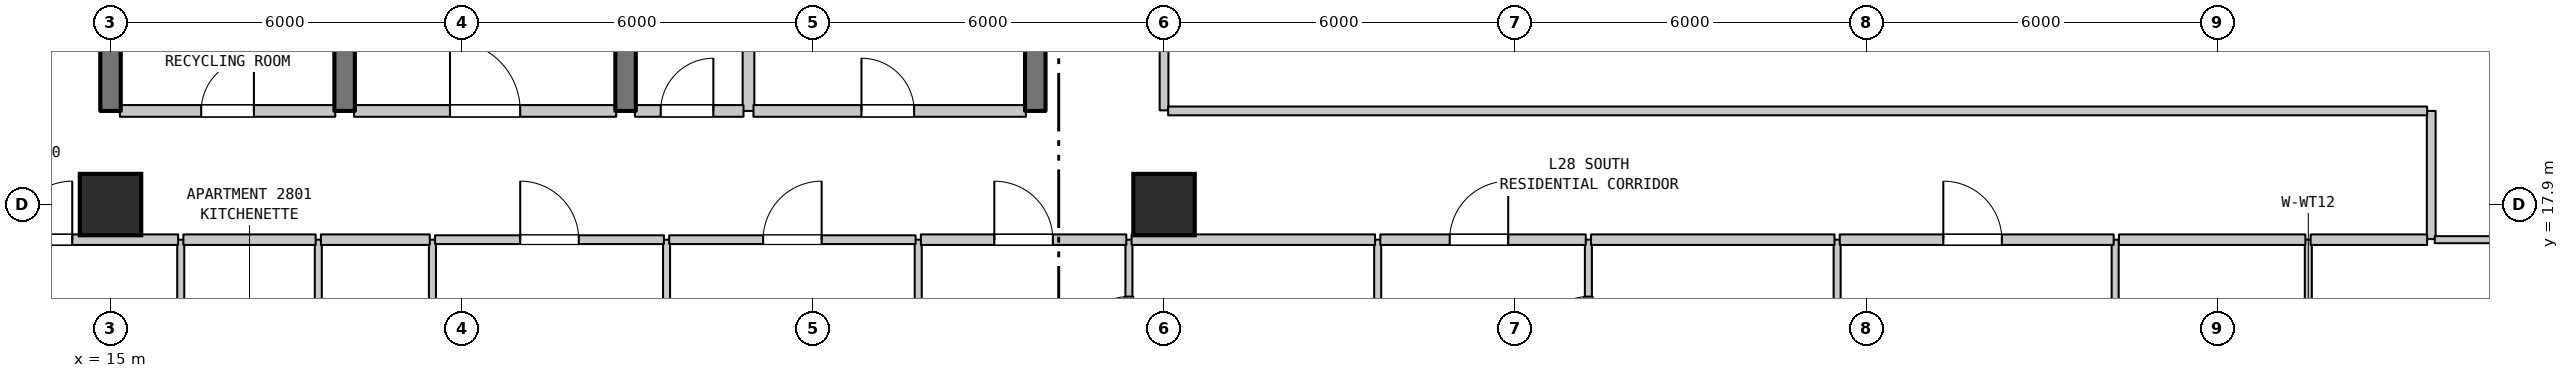
"""IFC4 building model, lengths in metres.
Left out: names, types, materials, properties, quantities, classifications, styles, units other than length and angle.
Written with IfcOpenShell. Run it as: python <this file> out.ifc"""

import sys

from ifc_helpers import new_model, si_unit, direction, frame, frame_2d, origin, origin_2d, place, context, subcontext, project, spatial, rectangle, extrude, element, fill, save


model = new_model("IFC4")
c1 = context("Model", 3, precision=1e-05, world=origin(), true_north=direction((0.0, 1.0)))
c2 = subcontext(c1, "Body", "Model", "MODEL_VIEW")
j1 = project(units=[si_unit("LENGTHUNIT", "METRE"), si_unit("PLANEANGLEUNIT", "RADIAN")], contexts=[c1])
p1 = place(None, origin())
s1 = spatial("IfcSite", under=j1, at=p1, CompositionType="ELEMENT")
p2 = place(p1, origin())
s2 = spatial("IfcBuilding", under=s1, at=p2, CompositionType="ELEMENT")
p3 = place(p2, frame((0.0, 0.0, 116.8)))
s3 = spatial("IfcBuildingStorey", under=s2, at=p3, CompositionType="ELEMENT", Elevation=116.8)
for number, where, z_axis, x_axis in (
    (1, (15.0, 17.9, 0.0), (0.0, 0.0, 1.0), (1.0, 0.0, 0.0)),
    (2, (33.0, 17.9, 0.0), (0.0, 0.0, 1.0), (1.0, 0.0, 0.0)),
):
    element("IfcColumn", number, at=place(p3, frame(where, z_axis=z_axis, x_axis=x_axis)), inside=s3, PredefinedType="COLUMN", context=c2, shape_type="SweptSolid", body=[
        extrude(rectangle(XDim=1.05, YDim=1.05, at=origin_2d()), origin(), (0.0, 0.0, 1.0), 3.7),
    ])
p4 = place(p3, frame((15.0, 19.5, 0.0), z_axis=(0.0, 0.0, 1.0), x_axis=(0.0, 1.0, 0.0)))
e3 = element("IfcWall", 3, at=p4, inside=s3, PredefinedType="SHEAR", context=c2, shape_type="SweptSolid", body=[
    extrude(rectangle(XDim=3.2, YDim=0.35, at=frame_2d((1.6, 0.0))), origin(), (0.0, 0.0, 1.0), 3.38),
])
p5 = place(p3, frame((16.2, 14.1, 0.0), z_axis=(0.0, 0.0, 1.0), x_axis=(0.0, 1.0, 0.0)))
e4 = element("IfcWall", 4, at=p5, inside=s3, PredefinedType="PARTITIONING", context=c2, shape_type="SweptSolid", body=[
    extrude(rectangle(XDim=3.2, YDim=0.12, at=frame_2d((1.6, 0.0))), origin(), (0.0, 0.0, 1.0), 3.38),
])
p6 = place(p5, frame((1.15, 0.0, 0.0)))
e5 = element("IfcOpeningElement", 5, at=p6, cuts=e4, PredefinedType="OPENING", context=c2, shape_type="SweptSolid", body=[
    extrude(rectangle(XDim=0.9, YDim=2.15, at=frame_2d((0.45, 1.075))), frame((0.0, 0.07, 0.0), z_axis=(0.0, -1.0, 0.0), x_axis=(1.0, 0.0, 0.0)), (0.0, 0.0, 1.0), 0.14),
])
p7 = place(p3, frame((18.55, 14.1, 0.0), z_axis=(0.0, 0.0, 1.0), x_axis=(0.0, 1.0, 0.0)))
e6 = element("IfcWall", 6, at=p7, inside=s3, PredefinedType="PARTITIONING", context=c2, shape_type="SweptSolid", body=[
    extrude(rectangle(XDim=3.2, YDim=0.12, at=frame_2d((1.6, 0.0))), origin(), (0.0, 0.0, 1.0), 3.38),
])
p8 = place(p3, frame((19.0, 19.5, 0.0), z_axis=(0.0, 0.0, 1.0), x_axis=(0.0, 1.0, 0.0)))
e7 = element("IfcWall", 7, at=p8, inside=s3, PredefinedType="SHEAR", context=c2, shape_type="SweptSolid", body=[
    extrude(rectangle(XDim=3.2, YDim=0.35, at=frame_2d((1.6, 0.0))), origin(), (0.0, 0.0, 1.0), 3.38),
])
p9 = place(p3, frame((20.5, 7.154, 0.0), z_axis=(0.0, 0.0, 1.0), x_axis=(0.0, 1.0, 0.0)))
e8 = element("IfcWall", 8, at=p9, inside=s3, PredefinedType="PARTITIONING", context=c2, shape_type="SweptSolid", body=[
    extrude(rectangle(XDim=10.146, YDim=0.12, at=frame_2d((5.073, 0.0))), origin(), (0.0, 0.0, 1.0), 3.38),
])
p10 = place(p3, frame((23.8, 19.5, 0.0), z_axis=(0.0, 0.0, 1.0), x_axis=(0.0, 1.0, 0.0)))
e9 = element("IfcWall", 9, at=p10, inside=s3, PredefinedType="SHEAR", context=c2, shape_type="SweptSolid", body=[
    extrude(rectangle(XDim=3.2, YDim=0.35, at=frame_2d((1.6, 0.0))), origin(), (0.0, 0.0, 1.0), 3.38),
])
p11 = place(p3, frame((24.5, 0.71, 0.0), z_axis=(0.0, 0.0, 1.0), x_axis=(0.0, 1.0, 0.0)))
e10 = element("IfcWall", 10, at=p11, inside=s3, PredefinedType="PARTITIONING", context=c2, shape_type="SweptSolid", body=[
    extrude(rectangle(XDim=16.59, YDim=0.12, at=frame_2d((8.295, 0.0))), origin(), (0.0, 0.0, 1.0), 3.38),
])
p12 = place(p3, frame((25.9, 19.5, 0.0), z_axis=(0.0, 0.0, 1.0), x_axis=(0.0, 1.0, 0.0)))
e11 = element("IfcWall", 11, at=p12, inside=s3, PredefinedType="STANDARD", context=c2, shape_type="SweptSolid", body=[
    extrude(rectangle(XDim=3.2, YDim=0.2, at=frame_2d((1.6, 0.0))), origin(), (0.0, 0.0, 1.0), 3.38),
])
p13 = place(p3, frame((28.8, 0.71, 0.0), z_axis=(0.0, 0.0, 1.0), x_axis=(0.0, 1.0, 0.0)))
e12 = element("IfcWall", 12, at=p13, inside=s3, PredefinedType="PARTITIONING", context=c2, shape_type="SweptSolid", body=[
    extrude(rectangle(XDim=16.59, YDim=0.12, at=frame_2d((8.295, 0.0))), origin(), (0.0, 0.0, 1.0), 3.38),
])
p14 = place(p3, frame((30.8, 19.5, 0.0), z_axis=(0.0, 0.0, 1.0), x_axis=(0.0, 1.0, 0.0)))
e13 = element("IfcWall", 13, at=p14, inside=s3, PredefinedType="SHEAR", context=c2, shape_type="SweptSolid", body=[
    extrude(rectangle(XDim=3.2, YDim=0.35, at=frame_2d((1.6, 0.0))), origin(), (0.0, 0.0, 1.0), 3.38),
])
p15 = place(p3, frame((32.4, 14.6, 0.0), z_axis=(0.0, 0.0, 1.0), x_axis=(0.0, 1.0, 0.0)))
e14 = element("IfcWall", 14, at=p15, inside=s3, PredefinedType="PARTITIONING", context=c2, shape_type="SweptSolid", body=[
    extrude(rectangle(XDim=2.7, YDim=0.12, at=frame_2d((1.35, 0.0))), origin(), (0.0, 0.0, 1.0), 3.38),
])
p16 = place(p15, frame((0.828, 0.0, 0.0)))
e15 = element("IfcOpeningElement", 15, at=p16, cuts=e14, PredefinedType="OPENING", context=c2, shape_type="SweptSolid", body=[
    extrude(rectangle(XDim=0.9, YDim=2.1, at=frame_2d((0.45, 1.05))), frame((0.0, 0.07, 0.0), z_axis=(0.0, -1.0, 0.0), x_axis=(1.0, 0.0, 0.0)), (0.0, 0.0, 1.0), 0.14),
])
p17 = place(p3, frame((33.0, 19.51, 0.0), z_axis=(0.0, 0.0, 1.0), x_axis=(0.0, 1.0, 0.0)))
e16 = element("IfcWall", 16, at=p17, inside=s3, PredefinedType="STANDARD", context=c2, shape_type="SweptSolid", body=[
    extrude(rectangle(XDim=6.18, YDim=0.15, at=frame_2d((3.09, 0.0))), origin(), (0.0, 0.0, 1.0), 2.93),
])
p18 = place(p3, frame((36.65, 14.6, 0.0), z_axis=(0.0, 0.0, 1.0), x_axis=(0.0, 1.0, 0.0)))
e17 = element("IfcWall", 17, at=p18, inside=s3, PredefinedType="PARTITIONING", context=c2, shape_type="SweptSolid", body=[
    extrude(rectangle(XDim=2.7, YDim=0.12, at=frame_2d((1.35, 0.0))), origin(), (0.0, 0.0, 1.0), 3.38),
])
p19 = place(p3, frame((40.25, 14.6, 0.0), z_axis=(0.0, 0.0, 1.0), x_axis=(0.0, 1.0, 0.0)))
e18 = element("IfcWall", 18, at=p19, inside=s3, PredefinedType="PARTITIONING", context=c2, shape_type="SweptSolid", body=[
    extrude(rectangle(XDim=2.7, YDim=0.12, at=frame_2d((1.35, 0.0))), origin(), (0.0, 0.0, 1.0), 3.38),
])
p20 = place(p19, frame((0.828, 0.0, 0.0)))
e19 = element("IfcOpeningElement", 19, at=p20, cuts=e18, PredefinedType="OPENING", context=c2, shape_type="SweptSolid", body=[
    extrude(rectangle(XDim=0.9, YDim=2.1, at=frame_2d((0.45, 1.05))), frame((0.0, 0.07, 0.0), z_axis=(0.0, -1.0, 0.0), x_axis=(1.0, 0.0, 0.0)), (0.0, 0.0, 1.0), 0.14),
])
p21 = place(p3, frame((44.5, 14.85, 0.0), z_axis=(0.0, 0.0, 1.0), x_axis=(0.0, 1.0, 0.0)))
e20 = element("IfcWall", 20, at=p21, inside=s3, PredefinedType="PARTITIONING", context=c2, shape_type="SweptSolid", body=[
    extrude(rectangle(XDim=2.45, YDim=0.12, at=frame_2d((1.225, 0.0))), origin(), (0.0, 0.0, 1.0), 3.38),
])
for number, where, z_axis, x_axis in (
    (21, (49.25, 11.15, 0.0), (0.0, 0.0, 1.0), (0.0, 1.0, 0.0)),
    (22, (52.55, 11.15, 0.0), (0.0, 0.0, 1.0), (0.0, 1.0, 0.0)),
):
    element("IfcWall", number, at=place(p3, frame(where, z_axis=z_axis, x_axis=x_axis)), inside=s3, PredefinedType="PARTITIONING", context=c2, shape_type="SweptSolid", body=[
        extrude(rectangle(XDim=6.15, YDim=0.12, at=frame_2d((3.075, 0.0))), origin(), (0.0, 0.0, 1.0), 3.38),
    ])
p22 = place(p3, frame((54.65, 17.31, 0.0), z_axis=(0.0, 0.0, 1.0), x_axis=(0.0, 1.0, 0.0)))
e23 = element("IfcWall", 23, at=p22, inside=s3, PredefinedType="STANDARD", context=c2, shape_type="SweptSolid", body=[
    extrude(rectangle(XDim=2.19, YDim=0.15, at=frame_2d((1.095, 0.0))), origin(), (0.0, 0.0, 1.0), 3.38),
])
p23 = place(p3, frame((12.875, 17.3, 0.0), z_axis=(0.0, 0.0, 1.0), x_axis=(1.0, 0.0, 0.0)))
e24 = element("IfcWall", 24, at=p23, inside=s3, PredefinedType="STANDARD", context=c2, shape_type="SweptSolid", body=[
    extrude(rectangle(XDim=3.28, YDim=0.18, at=frame_2d((1.64, 0.0))), origin(), (0.0, 0.0, 1.0), 3.38),
])
p24 = place(p23, frame((0.471, 0.0, 0.0)))
e25 = element("IfcOpeningElement", 25, at=p24, cuts=e24, PredefinedType="OPENING", context=c2, shape_type="SweptSolid", body=[
    extrude(rectangle(XDim=1.0, YDim=2.15, at=frame_2d((0.5, 1.075))), frame((0.0, 0.1, 0.0), z_axis=(0.0, -1.0, 0.0), x_axis=(1.0, 0.0, 0.0)), (0.0, 0.0, 1.0), 0.2),
])
p25 = place(p3, frame((16.245, 17.3, 0.0), z_axis=(0.0, 0.0, 1.0), x_axis=(1.0, 0.0, 0.0)))
e26 = element("IfcWall", 26, at=p25, inside=s3, PredefinedType="STANDARD", context=c2, shape_type="SweptSolid", body=[
    extrude(rectangle(XDim=2.26, YDim=0.18, at=frame_2d((1.13, 0.0))), origin(), (0.0, 0.0, 1.0), 3.38),
])
p26 = place(p3, frame((18.595, 17.3, 0.0), z_axis=(0.0, 0.0, 1.0), x_axis=(1.0, 0.0, 0.0)))
e27 = element("IfcWall", 27, at=p26, inside=s3, PredefinedType="STANDARD", context=c2, shape_type="SweptSolid", body=[
    extrude(rectangle(XDim=1.86, YDim=0.18, at=frame_2d((0.93, 0.0))), origin(), (0.0, 0.0, 1.0), 3.38),
])
p27 = place(p3, frame((20.545, 17.3, 0.0), z_axis=(0.0, 0.0, 1.0), x_axis=(1.0, 0.0, 0.0)))
e28 = element("IfcWall", 28, at=p27, inside=s3, PredefinedType="STANDARD", context=c2, shape_type="SweptSolid", body=[
    extrude(rectangle(XDim=3.91, YDim=0.15, at=frame_2d((1.955, 0.0))), origin(), (0.0, 0.0, 1.0), 3.38),
])
p28 = place(p27, frame((1.455, 0.0, 0.0)))
e29 = element("IfcOpeningElement", 29, at=p28, cuts=e28, PredefinedType="OPENING", context=c2, shape_type="SweptSolid", body=[
    extrude(rectangle(XDim=1.0, YDim=2.15, at=frame_2d((0.5, 1.075))), frame((0.0, 0.085, 0.0), z_axis=(0.0, -1.0, 0.0), x_axis=(1.0, 0.0, 0.0)), (0.0, 0.0, 1.0), 0.17),
])
p29 = place(p3, frame((24.545, 17.3, 0.0), z_axis=(0.0, 0.0, 1.0), x_axis=(1.0, 0.0, 0.0)))
e30 = element("IfcWall", 30, at=p29, inside=s3, PredefinedType="STANDARD", context=c2, shape_type="SweptSolid", body=[
    extrude(rectangle(XDim=4.21, YDim=0.15, at=frame_2d((2.105, 0.0))), origin(), (0.0, 0.0, 1.0), 3.38),
])
p30 = place(p29, frame((1.605, 0.0, 0.0)))
e31 = element("IfcOpeningElement", 31, at=p30, cuts=e30, PredefinedType="OPENING", context=c2, shape_type="SweptSolid", body=[
    extrude(rectangle(XDim=1.0, YDim=2.15, at=frame_2d((0.5, 1.075))), frame((0.0, 0.085, 0.0), z_axis=(0.0, -1.0, 0.0), x_axis=(1.0, 0.0, 0.0)), (0.0, 0.0, 1.0), 0.17),
])
p31 = place(p3, frame((28.845, 17.3, 0.0), z_axis=(0.0, 0.0, 1.0), x_axis=(1.0, 0.0, 0.0)))
e32 = element("IfcWall", 32, at=p31, inside=s3, PredefinedType="STANDARD", context=c2, shape_type="SweptSolid", body=[
    extrude(rectangle(XDim=3.51, YDim=0.18, at=frame_2d((1.755, 0.0))), origin(), (0.0, 0.0, 1.0), 3.38),
])
p32 = place(p31, frame((1.255, 0.0, 0.0)))
e33 = element("IfcOpeningElement", 33, at=p32, cuts=e32, PredefinedType="OPENING", context=c2, shape_type="SweptSolid", body=[
    extrude(rectangle(XDim=1.0, YDim=2.15, at=frame_2d((0.5, 1.075))), frame((0.0, 0.1, 0.0), z_axis=(0.0, -1.0, 0.0), x_axis=(1.0, 0.0, 0.0)), (0.0, 0.0, 1.0), 0.2),
])
p33 = place(p3, frame((32.445, 17.3, 0.0), z_axis=(0.0, 0.0, 1.0), x_axis=(1.0, 0.0, 0.0)))
e34 = element("IfcWall", 34, at=p33, inside=s3, PredefinedType="STANDARD", context=c2, shape_type="SweptSolid", body=[
    extrude(rectangle(XDim=4.16, YDim=0.18, at=frame_2d((2.08, 0.0))), origin(), (0.0, 0.0, 1.0), 3.38),
])
p34 = place(p3, frame((36.695, 17.3, 0.0), z_axis=(0.0, 0.0, 1.0), x_axis=(1.0, 0.0, 0.0)))
e35 = element("IfcWall", 35, at=p34, inside=s3, PredefinedType="STANDARD", context=c2, shape_type="SweptSolid", body=[
    extrude(rectangle(XDim=3.51, YDim=0.18, at=frame_2d((1.755, 0.0))), origin(), (0.0, 0.0, 1.0), 3.38),
])
p35 = place(p34, frame((1.185, 0.0, 0.0)))
e36 = element("IfcOpeningElement", 36, at=p35, cuts=e35, PredefinedType="OPENING", context=c2, shape_type="SweptSolid", body=[
    extrude(rectangle(XDim=1.0, YDim=2.15, at=frame_2d((0.5, 1.075))), frame((0.0, 0.1, 0.0), z_axis=(0.0, -1.0, 0.0), x_axis=(1.0, 0.0, 0.0)), (0.0, 0.0, 1.0), 0.2),
])
p36 = place(p3, frame((40.295, 17.3, 0.0), z_axis=(0.0, 0.0, 1.0), x_axis=(1.0, 0.0, 0.0)))
e37 = element("IfcWall", 37, at=p36, inside=s3, PredefinedType="STANDARD", context=c2, shape_type="SweptSolid", body=[
    extrude(rectangle(XDim=4.16, YDim=0.18, at=frame_2d((2.08, 0.0))), origin(), (0.0, 0.0, 1.0), 3.38),
])
p37 = place(p3, frame((44.545, 17.3, 0.0), z_axis=(0.0, 0.0, 1.0), x_axis=(1.0, 0.0, 0.0)))
e38 = element("IfcWall", 38, at=p37, inside=s3, PredefinedType="STANDARD", context=c2, shape_type="SweptSolid", body=[
    extrude(rectangle(XDim=4.68, YDim=0.18, at=frame_2d((2.34, 0.0))), origin(), (0.0, 0.0, 1.0), 3.38),
])
p38 = place(p37, frame((1.769, 0.0, 0.0)))
e39 = element("IfcOpeningElement", 39, at=p38, cuts=e38, PredefinedType="OPENING", context=c2, shape_type="SweptSolid", body=[
    extrude(rectangle(XDim=1.0, YDim=2.15, at=frame_2d((0.5, 1.075))), frame((0.0, 0.1, 0.0), z_axis=(0.0, -1.0, 0.0), x_axis=(1.0, 0.0, 0.0)), (0.0, 0.0, 1.0), 0.2),
])
p39 = place(p3, frame((49.315, 17.3, 0.0), z_axis=(0.0, 0.0, 1.0), x_axis=(1.0, 0.0, 0.0)))
e40 = element("IfcWall", 40, at=p39, inside=s3, PredefinedType="STANDARD", context=c2, shape_type="SweptSolid", body=[
    extrude(rectangle(XDim=3.185, YDim=0.18, at=frame_2d((1.593, 0.0))), origin(), (0.0, 0.0, 1.0), 3.38),
])
p40 = place(p3, frame((52.59, 17.3, 0.0), z_axis=(0.0, 0.0, 1.0), x_axis=(1.0, 0.0, 0.0)))
e41 = element("IfcWall", 41, at=p40, inside=s3, PredefinedType="STANDARD", context=c2, shape_type="SweptSolid", body=[
    extrude(rectangle(XDim=1.99, YDim=0.18, at=frame_2d((0.995, 0.0))), origin(), (0.0, 0.0, 1.0), 3.38),
])
p41 = place(p3, frame((54.71, 17.3, 0.0), z_axis=(0.0, 0.0, 1.0), x_axis=(1.0, 0.0, 0.0)))
e42 = element("IfcWall", 42, at=p41, inside=s3, PredefinedType="PARTITIONING", context=c2, shape_type="SweptSolid", body=[
    extrude(rectangle(XDim=1.635, YDim=0.12, at=frame_2d((0.817, 0.0))), origin(), (0.0, 0.0, 1.0), 3.38),
])
p42 = place(p3, frame((15.16, 19.5, 0.0), z_axis=(0.0, 0.0, 1.0), x_axis=(1.0, 0.0, 0.0)))
e43 = element("IfcWall", 43, at=p42, inside=s3, PredefinedType="STANDARD", context=c2, shape_type="SweptSolid", body=[
    extrude(rectangle(XDim=3.68, YDim=0.2, at=frame_2d((1.84, 0.0))), origin(), (0.0, 0.0, 1.0), 3.38),
])
p43 = place(p42, frame((1.39, 0.0, 0.0)))
e44 = element("IfcOpeningElement", 44, at=p43, cuts=e43, PredefinedType="OPENING", context=c2, shape_type="SweptSolid", body=[
    extrude(rectangle(XDim=0.9, YDim=2.15, at=frame_2d((0.45, 1.075))), frame((0.0, 0.11, 0.0), z_axis=(0.0, -1.0, 0.0), x_axis=(1.0, 0.0, 0.0)), (0.0, 0.0, 1.0), 0.22),
])
p44 = place(p3, frame((19.16, 19.5, 0.0), z_axis=(0.0, 0.0, 1.0), x_axis=(1.0, 0.0, 0.0)))
e45 = element("IfcWall", 45, at=p44, inside=s3, PredefinedType="STANDARD", context=c2, shape_type="SweptSolid", body=[
    extrude(rectangle(XDim=4.48, YDim=0.2, at=frame_2d((2.24, 0.0))), origin(), (0.0, 0.0, 1.0), 3.38),
])
p45 = place(p44, frame((1.64, 0.0, 0.0)))
e46 = element("IfcOpeningElement", 46, at=p45, cuts=e45, PredefinedType="OPENING", context=c2, shape_type="SweptSolid", body=[
    extrude(rectangle(XDim=1.2, YDim=2.2, at=frame_2d((0.6, 1.1))), frame((0.0, 0.11, 0.0), z_axis=(0.0, -1.0, 0.0), x_axis=(1.0, 0.0, 0.0)), (0.0, 0.0, 1.0), 0.22),
])
p46 = place(p3, frame((23.96, 19.5, 0.0), z_axis=(0.0, 0.0, 1.0), x_axis=(1.0, 0.0, 0.0)))
e47 = element("IfcWall", 47, at=p46, inside=s3, PredefinedType="STANDARD", context=c2, shape_type="SweptSolid", body=[
    extrude(rectangle(XDim=1.855, YDim=0.2, at=frame_2d((0.927, 0.0))), origin(), (0.0, 0.0, 1.0), 3.38),
])
p47 = place(p46, frame((0.44, 0.0, 0.0)))
e48 = element("IfcOpeningElement", 48, at=p47, cuts=e47, PredefinedType="OPENING", context=c2, shape_type="SweptSolid", body=[
    extrude(rectangle(XDim=0.9, YDim=2.15, at=frame_2d((0.45, 1.075))), frame((0.0, 0.11, 0.0), z_axis=(0.0, -1.0, 0.0), x_axis=(1.0, 0.0, 0.0)), (0.0, 0.0, 1.0), 0.22),
])
p48 = place(p3, frame((25.985, 19.5, 0.0), z_axis=(0.0, 0.0, 1.0), x_axis=(1.0, 0.0, 0.0)))
e49 = element("IfcWall", 49, at=p48, inside=s3, PredefinedType="STANDARD", context=c2, shape_type="SweptSolid", body=[
    extrude(rectangle(XDim=4.655, YDim=0.2, at=frame_2d((2.327, 0.0))), origin(), (0.0, 0.0, 1.0), 3.38),
])
p49 = place(p48, frame((1.845, 0.0, 0.0)))
e50 = element("IfcOpeningElement", 50, at=p49, cuts=e49, PredefinedType="OPENING", context=c2, shape_type="SweptSolid", body=[
    extrude(rectangle(XDim=0.9, YDim=2.15, at=frame_2d((0.45, 1.075))), frame((0.0, 0.11, 0.0), z_axis=(0.0, -1.0, 0.0), x_axis=(1.0, 0.0, 0.0)), (0.0, 0.0, 1.0), 0.22),
])
p50 = place(p3, frame((33.07, 19.5, 0.0), z_axis=(0.0, 0.0, 1.0), x_axis=(1.0, 0.0, 0.0)))
e51 = element("IfcWall", 51, at=p50, inside=s3, PredefinedType="STANDARD", context=c2, shape_type="SweptSolid", body=[
    extrude(rectangle(XDim=21.51, YDim=0.15, at=frame_2d((10.755, 0.0))), origin(), (0.0, 0.0, 1.0), 3.38),
])
p51 = place(p16, origin())
e52 = element("IfcDoor", 52, at=p51, inside=s3, OperationType="SINGLE_SWING_LEFT", PredefinedType="DOOR", context=c2, shape_type="SweptSolid", body=[
    extrude(rectangle(XDim=0.9, YDim=2.1, at=frame_2d((0.45, 1.05))), frame((0.0, 0.025, 0.0), z_axis=(0.0, -1.0, 0.0), x_axis=(1.0, 0.0, 0.0)), (0.0, 0.0, 1.0), 0.05),
])
fill(e15, e52)
p52 = place(p20, origin())
e53 = element("IfcDoor", 53, at=p52, inside=s3, OperationType="SINGLE_SWING_LEFT", PredefinedType="DOOR", context=c2, shape_type="SweptSolid", body=[
    extrude(rectangle(XDim=0.9, YDim=2.1, at=frame_2d((0.45, 1.05))), frame((0.0, 0.025, 0.0), z_axis=(0.0, -1.0, 0.0), x_axis=(1.0, 0.0, 0.0)), (0.0, 0.0, 1.0), 0.05),
])
fill(e19, e53)
p53 = place(p24, origin())
e54 = element("IfcDoor", 54, at=p53, inside=s3, OperationType="SINGLE_SWING_RIGHT", PredefinedType="DOOR", context=c2, shape_type="SweptSolid", body=[
    extrude(rectangle(XDim=1.0, YDim=2.15, at=frame_2d((0.5, 1.075))), frame((0.0, 0.025, 0.0), z_axis=(0.0, -1.0, 0.0), x_axis=(1.0, 0.0, 0.0)), (0.0, 0.0, 1.0), 0.05),
])
fill(e25, e54)
p54 = place(p28, origin())
e55 = element("IfcDoor", 55, at=p54, inside=s3, OperationType="SINGLE_SWING_LEFT", PredefinedType="DOOR", context=c2, shape_type="SweptSolid", body=[
    extrude(rectangle(XDim=1.0, YDim=2.15, at=frame_2d((0.5, 1.075))), frame((0.0, 0.025, 0.0), z_axis=(0.0, -1.0, 0.0), x_axis=(1.0, 0.0, 0.0)), (0.0, 0.0, 1.0), 0.05),
])
fill(e29, e55)
p55 = place(p30, origin())
e56 = element("IfcDoor", 56, at=p55, inside=s3, OperationType="SINGLE_SWING_RIGHT", PredefinedType="DOOR", context=c2, shape_type="SweptSolid", body=[
    extrude(rectangle(XDim=1.0, YDim=2.15, at=frame_2d((0.5, 1.075))), frame((0.0, 0.025, 0.0), z_axis=(0.0, -1.0, 0.0), x_axis=(1.0, 0.0, 0.0)), (0.0, 0.0, 1.0), 0.05),
])
fill(e31, e56)
p56 = place(p32, origin())
e57 = element("IfcDoor", 57, at=p56, inside=s3, OperationType="SINGLE_SWING_LEFT", PredefinedType="DOOR", context=c2, shape_type="SweptSolid", body=[
    extrude(rectangle(XDim=1.0, YDim=2.15, at=frame_2d((0.5, 1.075))), frame((0.0, 0.025, 0.0), z_axis=(0.0, -1.0, 0.0), x_axis=(1.0, 0.0, 0.0)), (0.0, 0.0, 1.0), 0.05),
])
fill(e33, e57)
p57 = place(p35, origin())
e58 = element("IfcDoor", 58, at=p57, inside=s3, OperationType="SINGLE_SWING_RIGHT", PredefinedType="DOOR", context=c2, shape_type="SweptSolid", body=[
    extrude(rectangle(XDim=1.0, YDim=2.15, at=frame_2d((0.5, 1.075))), frame((0.0, 0.025, 0.0), z_axis=(0.0, -1.0, 0.0), x_axis=(1.0, 0.0, 0.0)), (0.0, 0.0, 1.0), 0.05),
])
fill(e36, e58)
p58 = place(p38, origin())
e59 = element("IfcDoor", 59, at=p58, inside=s3, OperationType="SINGLE_SWING_LEFT", PredefinedType="DOOR", context=c2, shape_type="SweptSolid", body=[
    extrude(rectangle(XDim=1.0, YDim=2.15, at=frame_2d((0.5, 1.075))), frame((0.0, 0.025, 0.0), z_axis=(0.0, -1.0, 0.0), x_axis=(1.0, 0.0, 0.0)), (0.0, 0.0, 1.0), 0.05),
])
fill(e39, e59)
p59 = place(p43, origin())
e60 = element("IfcDoor", 60, at=p59, inside=s3, OperationType="SINGLE_SWING_RIGHT", PredefinedType="DOOR", context=c2, shape_type="SweptSolid", body=[
    extrude(rectangle(XDim=0.9, YDim=2.15, at=frame_2d((0.45, 1.075))), frame((0.0, 0.025, 0.0), z_axis=(0.0, -1.0, 0.0), x_axis=(1.0, 0.0, 0.0)), (0.0, 0.0, 1.0), 0.05),
])
fill(e44, e60)
p60 = place(p45, origin())
e61 = element("IfcDoor", 61, at=p60, inside=s3, OperationType="SINGLE_SWING_LEFT", PredefinedType="DOOR", context=c2, shape_type="SweptSolid", body=[
    extrude(rectangle(XDim=1.2, YDim=2.2, at=frame_2d((0.6, 1.1))), frame((0.0, 0.025, 0.0), z_axis=(0.0, -1.0, 0.0), x_axis=(1.0, 0.0, 0.0)), (0.0, 0.0, 1.0), 0.05),
])
fill(e46, e61)
p61 = place(p47, origin())
e62 = element("IfcDoor", 62, at=p61, inside=s3, OperationType="SINGLE_SWING_RIGHT", PredefinedType="DOOR", context=c2, shape_type="SweptSolid", body=[
    extrude(rectangle(XDim=0.9, YDim=2.15, at=frame_2d((0.45, 1.075))), frame((0.0, 0.025, 0.0), z_axis=(0.0, -1.0, 0.0), x_axis=(1.0, 0.0, 0.0)), (0.0, 0.0, 1.0), 0.05),
])
fill(e48, e62)
p62 = place(p49, origin())
e63 = element("IfcDoor", 63, at=p62, inside=s3, OperationType="SINGLE_SWING_LEFT", PredefinedType="DOOR", context=c2, shape_type="SweptSolid", body=[
    extrude(rectangle(XDim=0.9, YDim=2.15, at=frame_2d((0.45, 1.075))), frame((0.0, 0.025, 0.0), z_axis=(0.0, -1.0, 0.0), x_axis=(1.0, 0.0, 0.0)), (0.0, 0.0, 1.0), 0.05),
])
fill(e50, e63)
save(model, sys.argv[1])
